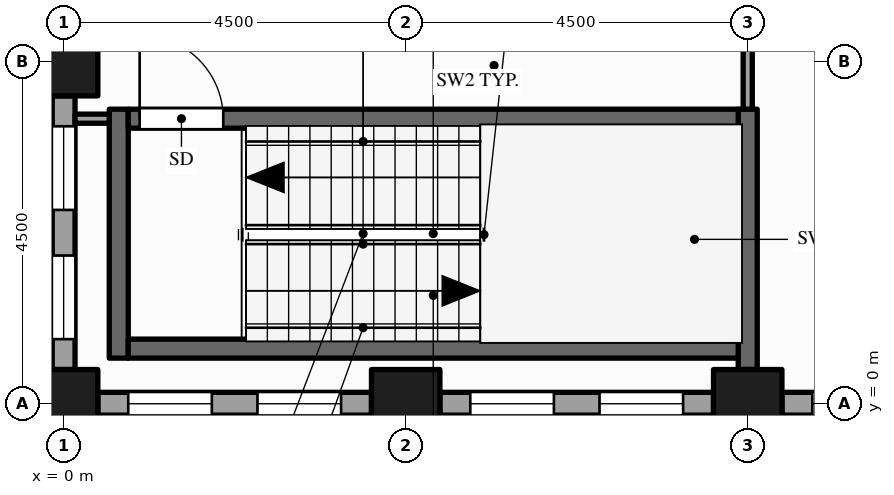
"""IFC4 building model, lengths in metres.
Left out: names, types, materials, properties, quantities, classifications, styles, units other than length and angle.
Written with IfcOpenShell. Run it as: python <this file> out.ifc"""

import sys

from ifc_helpers import new_model, si_unit, direction, frame, frame_2d, origin, origin_2d, place, context, subcontext, project, spatial, rectangle, hollow_rectangle, extrude, element, fill, save


model = new_model("IFC4")
c1 = context("Model", 3, precision=1e-05, world=origin(), true_north=direction((0.0, 1.0)))
c2 = subcontext(c1, "Body", "Model", "MODEL_VIEW")
j1 = project(units=[si_unit("LENGTHUNIT", "METRE"), si_unit("PLANEANGLEUNIT", "RADIAN")], contexts=[c1])
p1 = place(None, origin())
s1 = spatial("IfcSite", under=j1, at=p1, CompositionType="ELEMENT")
p2 = place(p1, origin())
s2 = spatial("IfcBuilding", under=s1, at=p2, CompositionType="ELEMENT")
p3 = place(p2, frame((0.0, 0.0, 143.0)))
s3 = spatial("IfcBuildingStorey", under=s2, at=p3, CompositionType="ELEMENT", Elevation=143.0)
for number, where, z_axis, x_axis in (
    (1, (0.0, 0.0, -0.15), (0.0, 0.0, 1.0), (1.0, 0.0, 0.0)),
    (2, (0.0, 4.5, -0.15), (0.0, 0.0, 1.0), (1.0, 0.0, 0.0)),
    (3, (4.5, 0.0, -0.15), (0.0, 0.0, 1.0), (1.0, 0.0, 0.0)),
    (4, (9.0, 0.0, -0.15), (0.0, 0.0, 1.0), (1.0, 0.0, 0.0)),
):
    element("IfcColumn", number, at=place(p3, frame(where, z_axis=z_axis, x_axis=x_axis)), inside=s3, PredefinedType="COLUMN", context=c2, shape_type="SweptSolid", body=[
        extrude(hollow_rectangle(XDim=0.9, YDim=0.9, WallThickness=0.045, at=origin_2d()), origin(), (0.0, 0.0, 1.0), 4.0),
    ])
p4 = place(p3, frame((0.0, 4.05, 0.0), z_axis=(0.0, 0.0, 1.0), x_axis=(0.0, -1.0, 0.0)))
e5 = element("IfcWall", 5, at=p4, inside=s3, PredefinedType="STANDARD", context=c2, shape_type="SweptSolid", body=[
    extrude(rectangle(XDim=3.6, YDim=0.3, at=frame_2d((1.8, 0.0))), origin(), (0.0, 0.0, 1.0), 3.149),
])
p5 = place(p4, frame((0.4, 0.0, 0.9)))
e6 = element("IfcOpeningElement", 6, at=p5, cuts=e5, PredefinedType="OPENING", context=c2, shape_type="SweptSolid", body=[
    extrude(rectangle(XDim=1.1, YDim=2.0, at=frame_2d((0.55, 1.0))), frame((0.0, 0.16, 0.0), z_axis=(0.0, -1.0, 0.0), x_axis=(1.0, 0.0, 0.0)), (0.0, 0.0, 1.0), 0.32),
])
p6 = place(p4, frame((2.1, 0.0, 0.9)))
e7 = element("IfcOpeningElement", 7, at=p6, cuts=e5, PredefinedType="OPENING", context=c2, shape_type="SweptSolid", body=[
    extrude(rectangle(XDim=1.1, YDim=2.0, at=frame_2d((0.55, 1.0))), frame((0.0, 0.16, 0.0), z_axis=(0.0, -1.0, 0.0), x_axis=(1.0, 0.0, 0.0)), (0.0, 0.0, 1.0), 0.32),
])
p7 = place(p3, frame((0.45, 0.0, 0.0), z_axis=(0.0, 0.0, 1.0), x_axis=(1.0, 0.0, 0.0)))
e8 = element("IfcWall", 8, at=p7, inside=s3, PredefinedType="STANDARD", context=c2, shape_type="SweptSolid", body=[
    extrude(rectangle(XDim=3.6, YDim=0.3, at=frame_2d((1.8, 0.0))), origin(), (0.0, 0.0, 1.0), 3.149),
])
p8 = place(p7, frame((0.4, 0.0, 0.9)))
e9 = element("IfcOpeningElement", 9, at=p8, cuts=e8, PredefinedType="OPENING", context=c2, shape_type="SweptSolid", body=[
    extrude(rectangle(XDim=1.1, YDim=2.0, at=frame_2d((0.55, 1.0))), frame((0.0, 0.16, 0.0), z_axis=(0.0, -1.0, 0.0), x_axis=(1.0, 0.0, 0.0)), (0.0, 0.0, 1.0), 0.32),
])
p9 = place(p7, frame((2.1, 0.0, 0.9)))
e10 = element("IfcOpeningElement", 10, at=p9, cuts=e8, PredefinedType="OPENING", context=c2, shape_type="SweptSolid", body=[
    extrude(rectangle(XDim=1.1, YDim=2.0, at=frame_2d((0.55, 1.0))), frame((0.0, 0.16, 0.0), z_axis=(0.0, -1.0, 0.0), x_axis=(1.0, 0.0, 0.0)), (0.0, 0.0, 1.0), 0.32),
])
p10 = place(p3, frame((4.95, 0.0, 0.0), z_axis=(0.0, 0.0, 1.0), x_axis=(1.0, 0.0, 0.0)))
e11 = element("IfcWall", 11, at=p10, inside=s3, PredefinedType="STANDARD", context=c2, shape_type="SweptSolid", body=[
    extrude(rectangle(XDim=3.6, YDim=0.3, at=frame_2d((1.8, 0.0))), origin(), (0.0, 0.0, 1.0), 3.149),
])
p11 = place(p10, frame((0.4, 0.0, 0.9)))
e12 = element("IfcOpeningElement", 12, at=p11, cuts=e11, PredefinedType="OPENING", context=c2, shape_type="SweptSolid", body=[
    extrude(rectangle(XDim=1.1, YDim=2.0, at=frame_2d((0.55, 1.0))), frame((0.0, 0.16, 0.0), z_axis=(0.0, -1.0, 0.0), x_axis=(1.0, 0.0, 0.0)), (0.0, 0.0, 1.0), 0.32),
])
p12 = place(p10, frame((2.1, 0.0, 0.9)))
e13 = element("IfcOpeningElement", 13, at=p12, cuts=e11, PredefinedType="OPENING", context=c2, shape_type="SweptSolid", body=[
    extrude(rectangle(XDim=1.1, YDim=2.0, at=frame_2d((0.55, 1.0))), frame((0.0, 0.16, 0.0), z_axis=(0.0, -1.0, 0.0), x_axis=(1.0, 0.0, 0.0)), (0.0, 0.0, 1.0), 0.32),
])
p13 = place(p3, frame((9.45, 0.0, 0.0), z_axis=(0.0, 0.0, 1.0), x_axis=(1.0, 0.0, 0.0)))
e14 = element("IfcWall", 14, at=p13, inside=s3, PredefinedType="STANDARD", context=c2, shape_type="SweptSolid", body=[
    extrude(rectangle(XDim=3.6, YDim=0.3, at=frame_2d((1.8, 0.0))), origin(), (0.0, 0.0, 1.0), 2.87),
])
p14 = place(p13, frame((0.4, 0.0, 0.9)))
e15 = element("IfcOpeningElement", 15, at=p14, cuts=e14, PredefinedType="OPENING", context=c2, shape_type="SweptSolid", body=[
    extrude(rectangle(XDim=1.1, YDim=1.75, at=frame_2d((0.55, 0.875))), frame((0.0, 0.16, 0.0), z_axis=(0.0, -1.0, 0.0), x_axis=(1.0, 0.0, 0.0)), (0.0, 0.0, 1.0), 0.32),
])
p15 = place(p13, frame((2.1, 0.0, 0.9)))
e16 = element("IfcOpeningElement", 16, at=p15, cuts=e14, PredefinedType="OPENING", context=c2, shape_type="SweptSolid", body=[
    extrude(rectangle(XDim=1.1, YDim=1.75, at=frame_2d((0.55, 0.875))), frame((0.0, 0.16, 0.0), z_axis=(0.0, -1.0, 0.0), x_axis=(1.0, 0.0, 0.0)), (0.0, 0.0, 1.0), 0.32),
])
p16 = place(p3, frame((0.725, 0.6, 0.0), z_axis=(0.0, 0.0, 1.0), x_axis=(0.0, 1.0, 0.0)))
e17 = element("IfcWall", 17, at=p16, inside=s3, PredefinedType="SHEAR", context=c2, shape_type="SweptSolid", body=[
    extrude(rectangle(XDim=3.275, YDim=0.25, at=frame_2d((1.637, 0.0))), origin(), (0.0, 0.0, 1.0), 3.85),
])
p17 = place(p3, frame((9.0, 0.15, 0.0), z_axis=(0.0, 0.0, 1.0), x_axis=(0.0, 1.0, 0.0)))
e18 = element("IfcWall", 18, at=p17, inside=s3, PredefinedType="PARTITIONING", context=c2, shape_type="SweptSolid", body=[
    extrude(rectangle(XDim=0.3, YDim=0.12, at=frame_2d((0.15, 0.0))), origin(), (0.0, 0.0, 1.0), 3.85),
])
p18 = place(p3, frame((9.0, 0.45, 0.0), z_axis=(0.0, 0.0, 1.0), x_axis=(0.0, 1.0, 0.0)))
e19 = element("IfcWall", 19, at=p18, inside=s3, PredefinedType="SHEAR", context=c2, shape_type="SweptSolid", body=[
    extrude(rectangle(XDim=3.425, YDim=0.25, at=frame_2d((1.712, 0.0))), origin(), (0.0, 0.0, 1.0), 3.85),
])
p19 = place(p3, frame((9.0, 3.875, 0.0), z_axis=(0.0, 0.0, 1.0), x_axis=(0.0, 1.0, 0.0)))
e20 = element("IfcWall", 20, at=p19, inside=s3, PredefinedType="PARTITIONING", context=c2, shape_type="SweptSolid", body=[
    extrude(rectangle(XDim=5.425, YDim=0.12, at=frame_2d((2.712, 0.0))), origin(), (0.0, 0.0, 1.0), 2.87),
])
p20 = place(p3, frame((0.85, 0.725, 0.0), z_axis=(0.0, 0.0, 1.0), x_axis=(1.0, 0.0, 0.0)))
e21 = element("IfcWall", 21, at=p20, inside=s3, PredefinedType="SHEAR", context=c2, shape_type="SweptSolid", body=[
    extrude(rectangle(XDim=8.025, YDim=0.25, at=frame_2d((4.012, 0.0))), origin(), (0.0, 0.0, 1.0), 3.85),
])
p21 = place(p3, frame((0.15, 3.75, 0.0), z_axis=(0.0, 0.0, 1.0), x_axis=(1.0, 0.0, 0.0)))
e22 = element("IfcWall", 22, at=p21, inside=s3, PredefinedType="PARTITIONING", context=c2, shape_type="SweptSolid", body=[
    extrude(rectangle(XDim=0.45, YDim=0.12, at=frame_2d((0.225, 0.0))), origin(), (0.0, 0.0, 1.0), 3.85),
])
p22 = place(p3, frame((0.85, 3.75, 0.0), z_axis=(0.0, 0.0, 1.0), x_axis=(1.0, 0.0, 0.0)))
e23 = element("IfcWall", 23, at=p22, inside=s3, PredefinedType="SHEAR", context=c2, shape_type="SweptSolid", body=[
    extrude(rectangle(XDim=8.025, YDim=0.25, at=frame_2d((4.012, 0.0))), origin(), (0.0, 0.0, 1.0), 3.85),
])
p23 = place(p22, frame((0.15, 0.0, 0.0)))
e24 = element("IfcOpeningElement", 24, at=p23, cuts=e23, PredefinedType="OPENING", context=c2, shape_type="SweptSolid", body=[
    extrude(rectangle(XDim=1.1, YDim=2.1, at=frame_2d((0.55, 1.05))), frame((0.0, 0.135, 0.0), z_axis=(0.0, -1.0, 0.0), x_axis=(1.0, 0.0, 0.0)), (0.0, 0.0, 1.0), 0.27),
])
p24 = place(p5, origin())
e25 = element("IfcWindow", 25, at=p24, inside=s3, PartitioningType="SINGLE_PANEL", PredefinedType="WINDOW", context=c2, shape_type="SweptSolid", body=[
    extrude(rectangle(XDim=1.1, YDim=2.0, at=frame_2d((0.55, 1.0))), frame((0.0, 0.03, 0.0), z_axis=(0.0, -1.0, 0.0), x_axis=(1.0, 0.0, 0.0)), (0.0, 0.0, 1.0), 0.06),
])
fill(e6, e25)
p25 = place(p6, origin())
e26 = element("IfcWindow", 26, at=p25, inside=s3, PartitioningType="SINGLE_PANEL", PredefinedType="WINDOW", context=c2, shape_type="SweptSolid", body=[
    extrude(rectangle(XDim=1.1, YDim=2.0, at=frame_2d((0.55, 1.0))), frame((0.0, 0.03, 0.0), z_axis=(0.0, -1.0, 0.0), x_axis=(1.0, 0.0, 0.0)), (0.0, 0.0, 1.0), 0.06),
])
fill(e7, e26)
p26 = place(p8, origin())
e27 = element("IfcWindow", 27, at=p26, inside=s3, PartitioningType="SINGLE_PANEL", PredefinedType="WINDOW", context=c2, shape_type="SweptSolid", body=[
    extrude(rectangle(XDim=1.1, YDim=2.0, at=frame_2d((0.55, 1.0))), frame((0.0, 0.03, 0.0), z_axis=(0.0, -1.0, 0.0), x_axis=(1.0, 0.0, 0.0)), (0.0, 0.0, 1.0), 0.06),
])
fill(e9, e27)
p27 = place(p9, origin())
e28 = element("IfcWindow", 28, at=p27, inside=s3, PartitioningType="SINGLE_PANEL", PredefinedType="WINDOW", context=c2, shape_type="SweptSolid", body=[
    extrude(rectangle(XDim=1.1, YDim=2.0, at=frame_2d((0.55, 1.0))), frame((0.0, 0.03, 0.0), z_axis=(0.0, -1.0, 0.0), x_axis=(1.0, 0.0, 0.0)), (0.0, 0.0, 1.0), 0.06),
])
fill(e10, e28)
p28 = place(p11, origin())
e29 = element("IfcWindow", 29, at=p28, inside=s3, PartitioningType="SINGLE_PANEL", PredefinedType="WINDOW", context=c2, shape_type="SweptSolid", body=[
    extrude(rectangle(XDim=1.1, YDim=2.0, at=frame_2d((0.55, 1.0))), frame((0.0, 0.03, 0.0), z_axis=(0.0, -1.0, 0.0), x_axis=(1.0, 0.0, 0.0)), (0.0, 0.0, 1.0), 0.06),
])
fill(e12, e29)
p29 = place(p12, origin())
e30 = element("IfcWindow", 30, at=p29, inside=s3, PartitioningType="SINGLE_PANEL", PredefinedType="WINDOW", context=c2, shape_type="SweptSolid", body=[
    extrude(rectangle(XDim=1.1, YDim=2.0, at=frame_2d((0.55, 1.0))), frame((0.0, 0.03, 0.0), z_axis=(0.0, -1.0, 0.0), x_axis=(1.0, 0.0, 0.0)), (0.0, 0.0, 1.0), 0.06),
])
fill(e13, e30)
p30 = place(p14, origin())
e31 = element("IfcWindow", 31, at=p30, inside=s3, PartitioningType="SINGLE_PANEL", PredefinedType="WINDOW", context=c2, shape_type="SweptSolid", body=[
    extrude(rectangle(XDim=1.1, YDim=1.75, at=frame_2d((0.55, 0.875))), frame((0.0, 0.03, 0.0), z_axis=(0.0, -1.0, 0.0), x_axis=(1.0, 0.0, 0.0)), (0.0, 0.0, 1.0), 0.06),
])
fill(e15, e31)
p31 = place(p23, origin())
e32 = element("IfcDoor", 32, at=p31, inside=s3, OperationType="SINGLE_SWING_LEFT", PredefinedType="DOOR", context=c2, shape_type="SweptSolid", body=[
    extrude(rectangle(XDim=1.1, YDim=2.1, at=frame_2d((0.55, 1.05))), frame((0.0, 0.025, 0.0), z_axis=(0.0, -1.0, 0.0), x_axis=(1.0, 0.0, 0.0)), (0.0, 0.0, 1.0), 0.05),
])
fill(e24, e32)
save(model, sys.argv[1])
